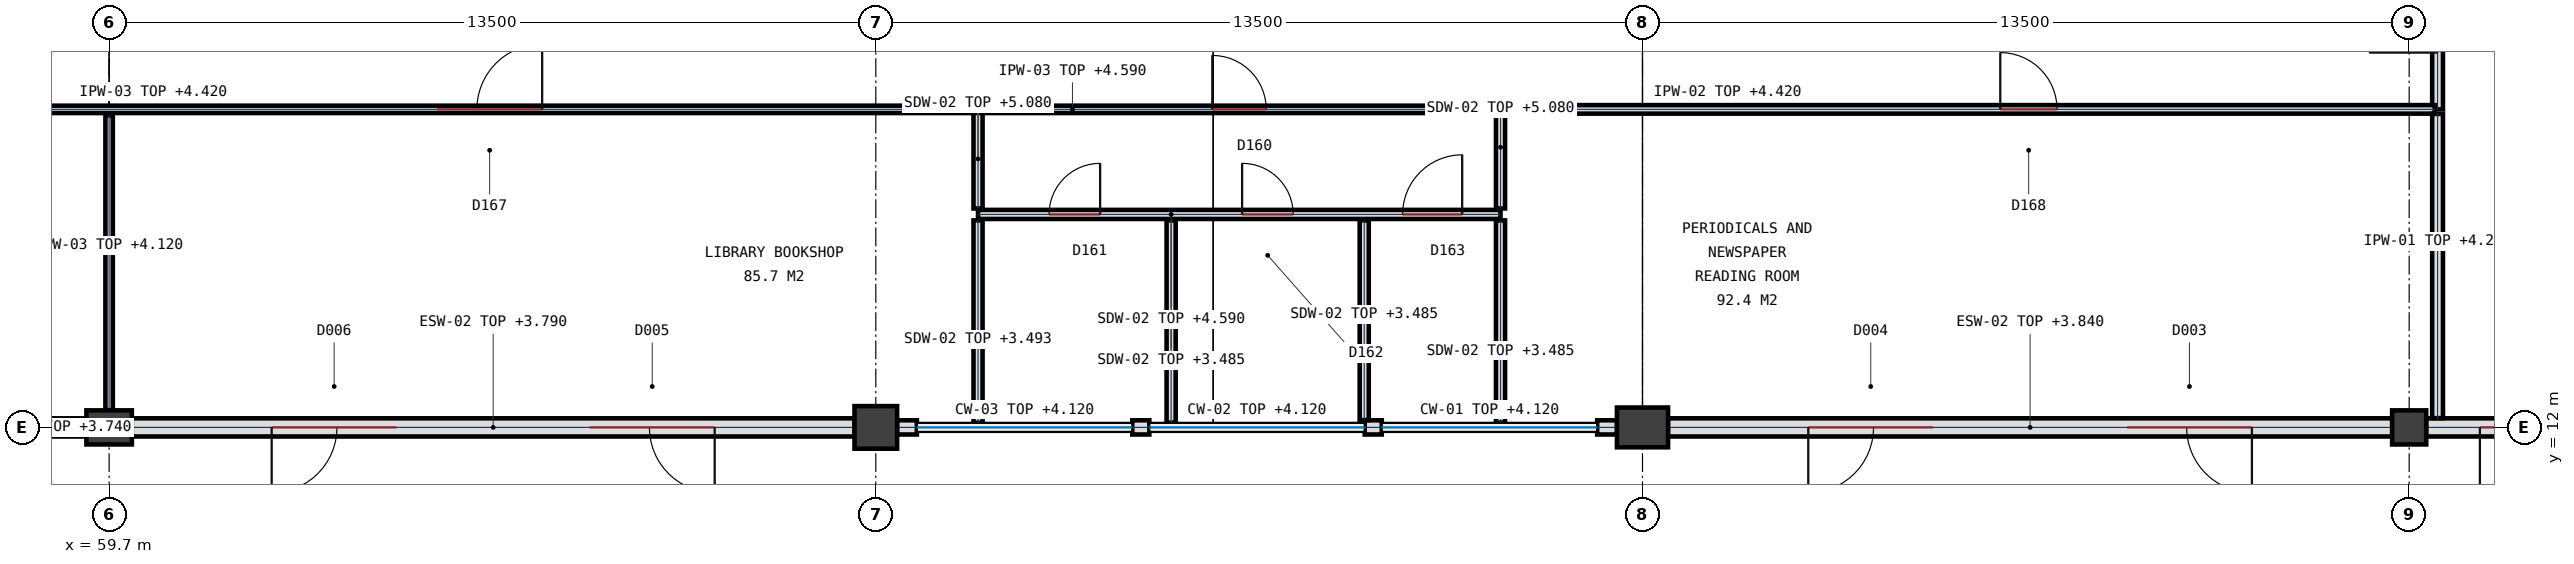
"""IFC4 building model, lengths in metres.
Left out: names, types, materials, properties, quantities, classifications, styles, units other than length and angle.
Written with IfcOpenShell. Run it as: python <this file> out.ifc"""

import sys

from ifc_helpers import new_model, si_unit, direction, frame, frame_2d, origin, origin_2d, place, context, subcontext, project, spatial, rectangle, circle, extrude, element, fill, save


model = new_model("IFC4")
c1 = context("Model", 3, precision=1e-05, world=origin(), true_north=direction((0.0, 1.0)))
c2 = subcontext(c1, "Body", "Model", "MODEL_VIEW")
j1 = project(units=[si_unit("LENGTHUNIT", "METRE"), si_unit("PLANEANGLEUNIT", "RADIAN")], contexts=[c1])
p1 = place(None, origin())
s1 = spatial("IfcSite", under=j1, at=p1, CompositionType="ELEMENT")
p2 = place(p1, origin())
s2 = spatial("IfcBuilding", under=s1, at=p2, CompositionType="ELEMENT")
p3 = place(p2, origin())
s3 = spatial("IfcBuildingStorey", under=s2, at=p3, CompositionType="ELEMENT", Elevation=0.0)
p4 = place(p3, frame((59.7, 12.0, 0.0), z_axis=(0.0, 0.0, 1.0), x_axis=(1.0, 0.0, 0.0)))
e1 = element("IfcColumn", 1, at=p4, inside=s3, PredefinedType="COLUMN", context=c2, shape_type="SweptSolid", body=[
    extrude(rectangle(XDim=0.8, YDim=0.6, at=origin_2d()), origin(), (0.0, 0.0, 1.0), 5.4),
])
p5 = place(p3, frame((73.2, 12.0, 0.0), z_axis=(0.0, 0.0, 1.0), x_axis=(1.0, 0.0, 0.0)))
e2 = element("IfcColumn", 2, at=p5, inside=s3, PredefinedType="COLUMN", context=c2, shape_type="SweptSolid", body=[
    extrude(rectangle(XDim=0.75, YDim=0.75, at=origin_2d()), origin(), (0.0, 0.0, 1.0), 5.4),
])
p6 = place(p3, frame((86.7, 12.0, 0.0), z_axis=(0.0, 0.0, 1.0), x_axis=(1.0, 0.0, 0.0)))
e3 = element("IfcColumn", 3, at=p6, inside=s3, PredefinedType="COLUMN", context=c2, shape_type="SweptSolid", body=[
    extrude(rectangle(XDim=0.9, YDim=0.7, at=origin_2d()), origin(), (0.0, 0.0, 1.0), 5.4),
])
p7 = place(p3, frame((100.2, 12.0, 0.0), z_axis=(0.0, 0.0, 1.0), x_axis=(1.0, 0.0, 0.0)))
e4 = element("IfcColumn", 4, at=p7, inside=s3, PredefinedType="COLUMN", context=c2, shape_type="SweptSolid", body=[
    extrude(circle(Radius=0.3, at=origin_2d()), origin(), (0.0, 0.0, 1.0), 5.4),
])
p8 = place(p3, frame((113.477, 12.0, 0.0), z_axis=(0.0, 0.0, 1.0), x_axis=(-1.0, 0.0, 0.0)))
e5 = element("IfcWall", 5, at=p8, inside=s3, PredefinedType="SOLIDWALL", context=c2, shape_type="SweptSolid", body=[
    extrude(rectangle(XDim=12.979, YDim=0.32, at=frame_2d((6.49, 0.0))), origin(), (0.0, 0.0, 1.0), 4.22),
])
p9 = place(p8, frame((10.882, 0.0, 0.0)))
e6 = element("IfcOpeningElement", 6, at=p9, cuts=e5, PredefinedType="OPENING", context=c2, shape_type="SweptSolid", body=[
    extrude(rectangle(XDim=1.15, YDim=2.15, at=frame_2d((0.575, 1.075))), frame((0.0, 0.17, 0.0), z_axis=(0.0, -1.0, 0.0), x_axis=(1.0, 0.0, 0.0)), (0.0, 0.0, 1.0), 0.34),
])
p10 = place(p8, frame((2.877, 0.0, 0.0)))
e7 = element("IfcOpeningElement", 7, at=p10, cuts=e5, PredefinedType="OPENING", context=c2, shape_type="SweptSolid", body=[
    extrude(rectangle(XDim=2.2, YDim=2.45, at=frame_2d((1.1, 1.225))), frame((0.0, 0.17, 0.0), z_axis=(0.0, -1.0, 0.0), x_axis=(1.0, 0.0, 0.0)), (0.0, 0.0, 1.0), 0.34),
])
p11 = place(p3, frame((99.902, 12.0, 0.0), z_axis=(0.0, 0.0, 1.0), x_axis=(-1.0, 0.0, 0.0)))
e8 = element("IfcWall", 8, at=p11, inside=s3, PredefinedType="SOLIDWALL", context=c2, shape_type="SweptSolid", body=[
    extrude(rectangle(XDim=12.754, YDim=0.32, at=frame_2d((6.377, 0.0))), origin(), (0.0, 0.0, 1.0), 3.84),
])
p12 = place(p11, frame((2.471, 0.0, 0.0)))
e9 = element("IfcOpeningElement", 9, at=p12, cuts=e8, PredefinedType="OPENING", context=c2, shape_type="SweptSolid", body=[
    extrude(rectangle(XDim=2.2, YDim=2.45, at=frame_2d((1.1, 1.225))), frame((0.0, 0.17, 0.0), z_axis=(0.0, -1.0, 0.0), x_axis=(1.0, 0.0, 0.0)), (0.0, 0.0, 1.0), 0.34),
])
p13 = place(p11, frame((8.083, 0.0, 0.0)))
e10 = element("IfcOpeningElement", 10, at=p13, cuts=e8, PredefinedType="OPENING", context=c2, shape_type="SweptSolid", body=[
    extrude(rectangle(XDim=2.2, YDim=2.45, at=frame_2d((1.1, 1.225))), frame((0.0, 0.17, 0.0), z_axis=(0.0, -1.0, 0.0), x_axis=(1.0, 0.0, 0.0)), (0.0, 0.0, 1.0), 0.34),
])
p14 = place(p3, frame((86.252, 12.0, 0.0), z_axis=(0.0, 0.0, 1.0), x_axis=(-1.0, 0.0, 0.0)))
e11 = element("IfcWall", 11, at=p14, inside=s3, PredefinedType="SOLIDWALL", context=c2, shape_type="SweptSolid", body=[
    extrude(rectangle(XDim=0.35, YDim=0.25, at=frame_2d((0.175, 0.0))), origin(), (0.0, 0.0, 1.0), 4.12),
])
p15 = place(p3, frame((73.923, 12.0, 0.0), z_axis=(0.0, 0.0, 1.0), x_axis=(-1.0, 0.0, 0.0)))
e12 = element("IfcWall", 12, at=p15, inside=s3, PredefinedType="SOLIDWALL", context=c2, shape_type="SweptSolid", body=[
    extrude(rectangle(XDim=0.35, YDim=0.25, at=frame_2d((0.175, 0.0))), origin(), (0.0, 0.0, 1.0), 4.12),
])
p16 = place(p3, frame((82.109, 12.0, 0.0), z_axis=(0.0, 0.0, 1.0), x_axis=(-1.0, 0.0, 0.0)))
e13 = element("IfcWall", 13, at=p16, inside=s3, PredefinedType="SOLIDWALL", context=c2, shape_type="SweptSolid", body=[
    extrude(rectangle(XDim=0.3, YDim=0.25, at=frame_2d((0.15, 0.0))), origin(), (0.0, 0.0, 1.0), 4.12),
])
p17 = place(p3, frame((78.016, 12.0, 0.0), z_axis=(0.0, 0.0, 1.0), x_axis=(-1.0, 0.0, 0.0)))
e14 = element("IfcWall", 14, at=p17, inside=s3, PredefinedType="SOLIDWALL", context=c2, shape_type="SweptSolid", body=[
    extrude(rectangle(XDim=0.3, YDim=0.25, at=frame_2d((0.15, 0.0))), origin(), (0.0, 0.0, 1.0), 4.12),
])
p18 = place(p3, frame((72.827, 12.0, 0.0), z_axis=(0.0, 0.0, 1.0), x_axis=(-1.0, 0.0, 0.0)))
e15 = element("IfcWall", 15, at=p18, inside=s3, PredefinedType="SOLIDWALL", context=c2, shape_type="SweptSolid", body=[
    extrude(rectangle(XDim=12.729, YDim=0.32, at=frame_2d((6.365, 0.0))), origin(), (0.0, 0.0, 1.0), 3.79),
])
p19 = place(p18, frame((2.464, 0.0, 0.0)))
e16 = element("IfcOpeningElement", 16, at=p19, cuts=e15, PredefinedType="OPENING", context=c2, shape_type="SweptSolid", body=[
    extrude(rectangle(XDim=2.2, YDim=2.45, at=frame_2d((1.1, 1.225))), frame((0.0, 0.17, 0.0), z_axis=(0.0, -1.0, 0.0), x_axis=(1.0, 0.0, 0.0)), (0.0, 0.0, 1.0), 0.34),
])
p20 = place(p18, frame((8.065, 0.0, 0.0)))
e17 = element("IfcOpeningElement", 17, at=p20, cuts=e15, PredefinedType="OPENING", context=c2, shape_type="SweptSolid", body=[
    extrude(rectangle(XDim=2.2, YDim=2.45, at=frame_2d((1.1, 1.225))), frame((0.0, 0.17, 0.0), z_axis=(0.0, -1.0, 0.0), x_axis=(1.0, 0.0, 0.0)), (0.0, 0.0, 1.0), 0.34),
])
p21 = place(p3, frame((59.302, 12.0, 0.0), z_axis=(0.0, 0.0, 1.0), x_axis=(-1.0, 0.0, 0.0)))
e18 = element("IfcWall", 18, at=p21, inside=s3, PredefinedType="SOLIDWALL", context=c2, shape_type="SweptSolid", body=[
    extrude(rectangle(XDim=12.804, YDim=0.32, at=frame_2d((6.402, 0.0))), origin(), (0.0, 0.0, 1.0), 3.74),
])
p22 = place(p21, frame((2.485, 0.0, 0.0)))
e19 = element("IfcOpeningElement", 19, at=p22, cuts=e18, PredefinedType="OPENING", context=c2, shape_type="SweptSolid", body=[
    extrude(rectangle(XDim=2.2, YDim=2.45, at=frame_2d((1.1, 1.225))), frame((0.0, 0.17, 0.0), z_axis=(0.0, -1.0, 0.0), x_axis=(1.0, 0.0, 0.0)), (0.0, 0.0, 1.0), 0.34),
])
p23 = place(p21, frame((8.119, 0.0, 0.0)))
e20 = element("IfcOpeningElement", 20, at=p23, cuts=e18, PredefinedType="OPENING", context=c2, shape_type="SweptSolid", body=[
    extrude(rectangle(XDim=2.2, YDim=2.45, at=frame_2d((1.1, 1.225))), frame((0.0, 0.17, 0.0), z_axis=(0.0, -1.0, 0.0), x_axis=(1.0, 0.0, 0.0)), (0.0, 0.0, 1.0), 0.34),
])
p24 = place(p3, frame((75.0, 15.75, 0.0), z_axis=(0.0, 0.0, 1.0), x_axis=(1.0, 0.0, 0.0)))
e21 = element("IfcWall", 21, at=p24, inside=s3, PredefinedType="PLUMBINGWALL", context=c2, shape_type="SweptSolid", body=[
    extrude(rectangle(XDim=9.2, YDim=0.16, at=frame_2d((4.6, 0.0))), origin(), (0.0, 0.0, 1.0), 4.59),
])
p25 = place(p24, frame((1.25, 0.0, 0.0)))
e22 = element("IfcOpeningElement", 22, at=p25, cuts=e21, PredefinedType="OPENING", context=c2, shape_type="SweptSolid", body=[
    extrude(rectangle(XDim=0.9, YDim=2.1, at=frame_2d((0.45, 1.05))), frame((0.0, 0.09, 0.0), z_axis=(0.0, -1.0, 0.0), x_axis=(1.0, 0.0, 0.0)), (0.0, 0.0, 1.0), 0.18),
])
p26 = place(p24, frame((4.65, 0.0, 0.0)))
e23 = element("IfcOpeningElement", 23, at=p26, cuts=e21, PredefinedType="OPENING", context=c2, shape_type="SweptSolid", body=[
    extrude(rectangle(XDim=0.9, YDim=2.1, at=frame_2d((0.45, 1.05))), frame((0.0, 0.09, 0.0), z_axis=(0.0, -1.0, 0.0), x_axis=(1.0, 0.0, 0.0)), (0.0, 0.0, 1.0), 0.18),
])
p27 = place(p24, frame((7.475, 0.0, 0.0)))
e24 = element("IfcOpeningElement", 24, at=p27, cuts=e21, PredefinedType="OPENING", context=c2, shape_type="SweptSolid", body=[
    extrude(rectangle(XDim=1.05, YDim=2.15, at=frame_2d((0.525, 1.075))), frame((0.0, 0.09, 0.0), z_axis=(0.0, -1.0, 0.0), x_axis=(1.0, 0.0, 0.0)), (0.0, 0.0, 1.0), 0.18),
])
p28 = place(p3, frame((75.0, 12.083, 0.0), z_axis=(0.0, 0.0, 1.0), x_axis=(0.0, 1.0, 0.0)))
e25 = element("IfcWall", 25, at=p28, inside=s3, PredefinedType="PLUMBINGWALL", context=c2, shape_type="SweptSolid", body=[
    extrude(rectangle(XDim=3.562, YDim=0.16, at=frame_2d((1.781, 0.0))), origin(), (0.0, 0.0, 1.0), 3.492),
])
p29 = place(p3, frame((75.0, 15.855, 0.0), z_axis=(0.0, 0.0, 1.0), x_axis=(0.0, 1.0, 0.0)))
e26 = element("IfcWall", 26, at=p29, inside=s3, PredefinedType="PLUMBINGWALL", context=c2, shape_type="SweptSolid", body=[
    extrude(rectangle(XDim=1.745, YDim=0.16, at=frame_2d((0.873, 0.0))), origin(), (0.0, 0.0, 1.0), 5.08),
])
p30 = place(p3, frame((78.4, 12.083, 0.0), z_axis=(0.0, 0.0, 1.0), x_axis=(0.0, 1.0, 0.0)))
e27 = element("IfcWall", 27, at=p30, inside=s3, PredefinedType="PLUMBINGWALL", context=c2, shape_type="SweptSolid", body=[
    extrude(rectangle(XDim=3.562, YDim=0.16, at=frame_2d((1.781, 0.0))), origin(), (0.0, 0.0, 1.0), 3.485),
])
p31 = place(p3, frame((81.8, 12.129, 0.0), z_axis=(0.0, 0.0, 1.0), x_axis=(0.0, 1.0, 0.0)))
e28 = element("IfcWall", 28, at=p31, inside=s3, PredefinedType="PLUMBINGWALL", context=c2, shape_type="SweptSolid", body=[
    extrude(rectangle(XDim=3.516, YDim=0.16, at=frame_2d((1.758, 0.0))), origin(), (0.0, 0.0, 1.0), 3.485),
])
p32 = place(p3, frame((84.2, 12.083, 0.0), z_axis=(0.0, 0.0, 1.0), x_axis=(0.0, 1.0, 0.0)))
e29 = element("IfcWall", 29, at=p32, inside=s3, PredefinedType="PLUMBINGWALL", context=c2, shape_type="SweptSolid", body=[
    extrude(rectangle(XDim=3.562, YDim=0.16, at=frame_2d((1.781, 0.0))), origin(), (0.0, 0.0, 1.0), 3.485),
])
p33 = place(p3, frame((84.2, 15.855, 0.0), z_axis=(0.0, 0.0, 1.0), x_axis=(0.0, 1.0, 0.0)))
e30 = element("IfcWall", 30, at=p33, inside=s3, PredefinedType="PLUMBINGWALL", context=c2, shape_type="SweptSolid", body=[
    extrude(rectangle(XDim=1.745, YDim=0.16, at=frame_2d((0.873, 0.0))), origin(), (0.0, 0.0, 1.0), 5.08),
])
p34 = place(p3, frame((100.7, 17.6, 0.0), z_axis=(0.0, 0.0, 1.0), x_axis=(0.0, 1.0, 0.0)))
e31 = element("IfcWall", 31, at=p34, inside=s3, PredefinedType="PARTITIONING", context=c2, shape_type="SweptSolid", body=[
    extrude(rectangle(XDim=3.2, YDim=0.19, at=frame_2d((1.6, 0.0))), origin(), (0.0, 0.0, 1.0), 5.08),
])
p35 = place(p34, frame((1.0, 0.0, 0.0)))
e32 = element("IfcOpeningElement", 32, at=p35, cuts=e31, PredefinedType="OPENING", context=c2, shape_type="SweptSolid", body=[
    extrude(rectangle(XDim=1.2, YDim=2.2, at=frame_2d((0.6, 1.1))), frame((0.0, 0.105, 0.0), z_axis=(0.0, -1.0, 0.0), x_axis=(1.0, 0.0, 0.0)), (0.0, 0.0, 1.0), 0.21),
])
p36 = place(p3, frame((32.25, 17.6, 0.0), z_axis=(0.0, 0.0, 1.0), x_axis=(1.0, 0.0, 0.0)))
e33 = element("IfcWall", 33, at=p36, inside=s3, PredefinedType="PARTITIONING", context=c2, shape_type="SweptSolid", body=[
    extrude(rectangle(XDim=42.7, YDim=0.13, at=frame_2d((21.35, 0.0))), origin(), (0.0, 0.0, 1.0), 4.42),
])
p37 = place(p36, frame((16.325, 0.0, 0.0)))
e34 = element("IfcOpeningElement", 34, at=p37, cuts=e33, PredefinedType="OPENING", context=c2, shape_type="SweptSolid", body=[
    extrude(rectangle(XDim=1.85, YDim=2.35, at=frame_2d((0.925, 1.175))), frame((0.0, 0.075, 0.0), z_axis=(0.0, -1.0, 0.0), x_axis=(1.0, 0.0, 0.0)), (0.0, 0.0, 1.0), 0.15),
])
p38 = place(p36, frame((33.225, 0.0, 0.0)))
e35 = element("IfcOpeningElement", 35, at=p38, cuts=e33, PredefinedType="OPENING", context=c2, shape_type="SweptSolid", body=[
    extrude(rectangle(XDim=1.85, YDim=2.35, at=frame_2d((0.925, 1.175))), frame((0.0, 0.075, 0.0), z_axis=(0.0, -1.0, 0.0), x_axis=(1.0, 0.0, 0.0)), (0.0, 0.0, 1.0), 0.15),
])
p39 = place(p3, frame((75.05, 17.6, 0.0), z_axis=(0.0, 0.0, 1.0), x_axis=(1.0, 0.0, 0.0)))
e36 = element("IfcWall", 36, at=p39, inside=s3, PredefinedType="PARTITIONING", context=c2, shape_type="SweptSolid", body=[
    extrude(rectangle(XDim=9.1, YDim=0.13, at=frame_2d((4.55, 0.0))), origin(), (0.0, 0.0, 1.0), 4.59),
])
p40 = place(p39, frame((4.075, 0.0, 0.0)))
e37 = element("IfcOpeningElement", 37, at=p40, cuts=e36, PredefinedType="OPENING", context=c2, shape_type="SweptSolid", body=[
    extrude(rectangle(XDim=0.95, YDim=2.15, at=frame_2d((0.475, 1.075))), frame((0.0, 0.075, 0.0), z_axis=(0.0, -1.0, 0.0), x_axis=(1.0, 0.0, 0.0)), (0.0, 0.0, 1.0), 0.15),
])
p41 = place(p3, frame((84.25, 17.6, 0.0), z_axis=(0.0, 0.0, 1.0), x_axis=(1.0, 0.0, 0.0)))
e38 = element("IfcWall", 38, at=p41, inside=s3, PredefinedType="PARTITIONING", context=c2, shape_type="SweptSolid", body=[
    extrude(rectangle(XDim=16.4, YDim=0.15, at=frame_2d((8.2, 0.0))), origin(), (0.0, 0.0, 1.0), 4.42),
])
p42 = place(p41, frame((8.75, 0.0, 0.0)))
e39 = element("IfcOpeningElement", 39, at=p42, cuts=e38, PredefinedType="OPENING", context=c2, shape_type="SweptSolid", body=[
    extrude(rectangle(XDim=1.0, YDim=2.2, at=frame_2d((0.5, 1.1))), frame((0.0, 0.085, 0.0), z_axis=(0.0, -1.0, 0.0), x_axis=(1.0, 0.0, 0.0)), (0.0, 0.0, 1.0), 0.17),
])
p43 = place(p3, frame((59.7, 12.303, 0.0), z_axis=(0.0, 0.0, 1.0), x_axis=(0.0, 1.0, 0.0)))
e40 = element("IfcWall", 40, at=p43, inside=s3, PredefinedType="PARTITIONING", context=c2, shape_type="SweptSolid", body=[
    extrude(rectangle(XDim=5.192, YDim=0.13, at=frame_2d((2.596, 0.0))), origin(), (0.0, 0.0, 1.0), 4.12),
])
p44 = place(p3, frame((100.7, 12.163, 0.0), z_axis=(0.0, 0.0, 1.0), x_axis=(0.0, 1.0, 0.0)))
e41 = element("IfcWall", 41, at=p44, inside=s3, PredefinedType="PARTITIONING", context=c2, shape_type="SweptSolid", body=[
    extrude(rectangle(XDim=5.357, YDim=0.19, at=frame_2d((2.678, 0.0))), origin(), (0.0, 0.0, 1.0), 4.27),
])
p45 = place(p9, origin())
e42 = element("IfcDoor", 42, at=p45, inside=s3, OperationType="SINGLE_SWING_RIGHT", PredefinedType="DOOR", context=c2, shape_type="SweptSolid", body=[
    extrude(rectangle(XDim=1.15, YDim=2.15, at=frame_2d((0.575, 1.075))), frame((0.0, 0.032, 0.0), z_axis=(0.0, -1.0, 0.0), x_axis=(1.0, 0.0, 0.0)), (0.0, 0.0, 1.0), 0.065),
])
fill(e6, e42)
p46 = place(p12, origin())
e43 = element("IfcDoor", 43, at=p46, inside=s3, OperationType="SINGLE_SWING_LEFT", PredefinedType="DOOR", context=c2, shape_type="SweptSolid", body=[
    extrude(rectangle(XDim=2.2, YDim=2.45, at=frame_2d((1.1, 1.225))), frame((0.0, 0.032, 0.0), z_axis=(0.0, -1.0, 0.0), x_axis=(1.0, 0.0, 0.0)), (0.0, 0.0, 1.0), 0.065),
])
fill(e9, e43)
p47 = place(p13, origin())
e44 = element("IfcDoor", 44, at=p47, inside=s3, OperationType="SINGLE_SWING_RIGHT", PredefinedType="DOOR", context=c2, shape_type="SweptSolid", body=[
    extrude(rectangle(XDim=2.2, YDim=2.45, at=frame_2d((1.1, 1.225))), frame((0.0, 0.032, 0.0), z_axis=(0.0, -1.0, 0.0), x_axis=(1.0, 0.0, 0.0)), (0.0, 0.0, 1.0), 0.065),
])
fill(e10, e44)
p48 = place(p19, origin())
e45 = element("IfcDoor", 45, at=p48, inside=s3, OperationType="SINGLE_SWING_LEFT", PredefinedType="DOOR", context=c2, shape_type="SweptSolid", body=[
    extrude(rectangle(XDim=2.2, YDim=2.45, at=frame_2d((1.1, 1.225))), frame((0.0, 0.032, 0.0), z_axis=(0.0, -1.0, 0.0), x_axis=(1.0, 0.0, 0.0)), (0.0, 0.0, 1.0), 0.065),
])
fill(e16, e45)
p49 = place(p20, origin())
e46 = element("IfcDoor", 46, at=p49, inside=s3, OperationType="SINGLE_SWING_RIGHT", PredefinedType="DOOR", context=c2, shape_type="SweptSolid", body=[
    extrude(rectangle(XDim=2.2, YDim=2.45, at=frame_2d((1.1, 1.225))), frame((0.0, 0.032, 0.0), z_axis=(0.0, -1.0, 0.0), x_axis=(1.0, 0.0, 0.0)), (0.0, 0.0, 1.0), 0.065),
])
fill(e17, e46)
p50 = place(p40, origin())
e47 = element("IfcDoor", 47, at=p50, inside=s3, OperationType="SINGLE_SWING_LEFT", PredefinedType="DOOR", context=c2, shape_type="SweptSolid", body=[
    extrude(rectangle(XDim=0.95, YDim=2.15, at=frame_2d((0.475, 1.075))), frame((0.0, 0.032, 0.0), z_axis=(0.0, -1.0, 0.0), x_axis=(1.0, 0.0, 0.0)), (0.0, 0.0, 1.0), 0.065),
])
fill(e37, e47)
p51 = place(p25, origin())
e48 = element("IfcDoor", 48, at=p51, inside=s3, OperationType="SINGLE_SWING_RIGHT", PredefinedType="DOOR", context=c2, shape_type="SweptSolid", body=[
    extrude(rectangle(XDim=0.9, YDim=2.1, at=frame_2d((0.45, 1.05))), frame((0.0, 0.032, 0.0), z_axis=(0.0, -1.0, 0.0), x_axis=(1.0, 0.0, 0.0)), (0.0, 0.0, 1.0), 0.065),
])
fill(e22, e48)
p52 = place(p26, origin())
e49 = element("IfcDoor", 49, at=p52, inside=s3, OperationType="SINGLE_SWING_LEFT", PredefinedType="DOOR", context=c2, shape_type="SweptSolid", body=[
    extrude(rectangle(XDim=0.9, YDim=2.1, at=frame_2d((0.45, 1.05))), frame((0.0, 0.032, 0.0), z_axis=(0.0, -1.0, 0.0), x_axis=(1.0, 0.0, 0.0)), (0.0, 0.0, 1.0), 0.065),
])
fill(e23, e49)
p53 = place(p27, origin())
e50 = element("IfcDoor", 50, at=p53, inside=s3, OperationType="SINGLE_SWING_RIGHT", PredefinedType="DOOR", context=c2, shape_type="SweptSolid", body=[
    extrude(rectangle(XDim=1.05, YDim=2.15, at=frame_2d((0.525, 1.075))), frame((0.0, 0.032, 0.0), z_axis=(0.0, -1.0, 0.0), x_axis=(1.0, 0.0, 0.0)), (0.0, 0.0, 1.0), 0.065),
])
fill(e24, e50)
p54 = place(p38, origin())
e51 = element("IfcDoor", 51, at=p54, inside=s3, OperationType="SINGLE_SWING_RIGHT", PredefinedType="DOOR", context=c2, shape_type="SweptSolid", body=[
    extrude(rectangle(XDim=1.85, YDim=2.35, at=frame_2d((0.925, 1.175))), frame((0.0, 0.032, 0.0), z_axis=(0.0, -1.0, 0.0), x_axis=(1.0, 0.0, 0.0)), (0.0, 0.0, 1.0), 0.065),
])
fill(e35, e51)
p55 = place(p42, origin())
e52 = element("IfcDoor", 52, at=p55, inside=s3, OperationType="SINGLE_SWING_LEFT", PredefinedType="DOOR", context=c2, shape_type="SweptSolid", body=[
    extrude(rectangle(XDim=1.0, YDim=2.2, at=frame_2d((0.5, 1.1))), frame((0.0, 0.032, 0.0), z_axis=(0.0, -1.0, 0.0), x_axis=(1.0, 0.0, 0.0)), (0.0, 0.0, 1.0), 0.065),
])
fill(e39, e52)
save(model, sys.argv[1])
